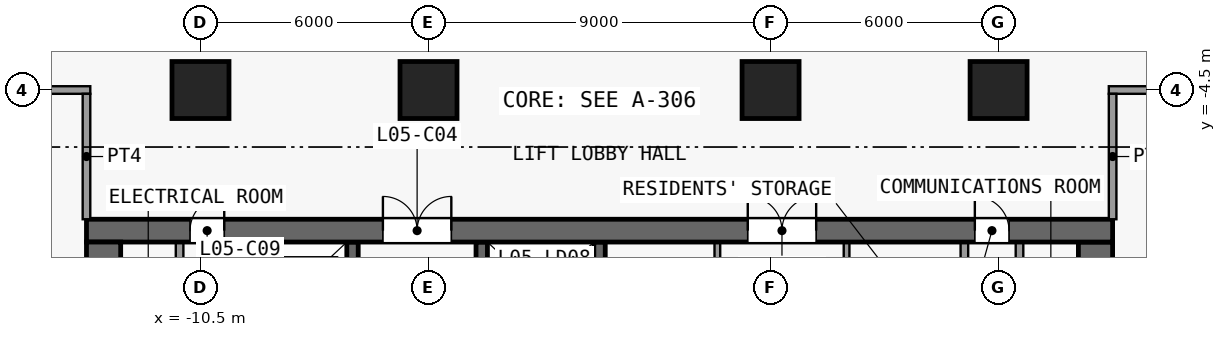
"""IFC4 building model, lengths in metres.
Left out: names, types, materials, properties, quantities, classifications, styles, units other than length and angle.
Written with IfcOpenShell. Run it as: python <this file> out.ifc"""

import sys

from ifc_helpers import new_model, si_unit, direction, frame, frame_2d, origin, origin_2d, place, context, subcontext, project, spatial, rectangle, extrude, element, fill, save


model = new_model("IFC4")
c1 = context("Model", 3, precision=1e-05, world=origin(), true_north=direction((0.0, 1.0)))
c2 = subcontext(c1, "Body", "Model", "MODEL_VIEW")
j1 = project(units=[si_unit("LENGTHUNIT", "METRE"), si_unit("PLANEANGLEUNIT", "RADIAN")], contexts=[c1])
p1 = place(None, origin())
s1 = spatial("IfcSite", under=j1, at=p1, CompositionType="ELEMENT")
p2 = place(p1, origin())
s2 = spatial("IfcBuilding", under=s1, at=p2, CompositionType="ELEMENT")
p3 = place(p2, frame((0.0, 0.0, 28.0)))
s3 = spatial("IfcBuildingStorey", under=s2, at=p3, CompositionType="ELEMENT", Elevation=28.0)
for number, where, z_axis, x_axis in (
    (1, (-10.5, -4.5, 0.0), (0.0, 0.0, 1.0), (1.0, 0.0, 0.0)),
    (2, (-4.5, -4.5, 0.0), (0.0, 0.0, 1.0), (1.0, 0.0, 0.0)),
    (3, (4.5, -4.5, 0.0), (0.0, 0.0, 1.0), (1.0, 0.0, 0.0)),
    (4, (10.5, -4.5, 0.0), (0.0, 0.0, 1.0), (1.0, 0.0, 0.0)),
):
    element("IfcColumn", number, at=place(p3, frame(where, z_axis=z_axis, x_axis=x_axis)), inside=s3, PredefinedType="COLUMN", context=c2, shape_type="SweptSolid", body=[
        extrude(rectangle(XDim=1.5, YDim=1.5, at=origin_2d()), origin(), (0.0, 0.0, 1.0), 4.5),
    ])
p4 = place(p3, frame((-13.5, -8.2, 0.0), z_axis=(0.0, 0.0, 1.0), x_axis=(1.0, 0.0, 0.0)))
e5 = element("IfcWall", 5, at=p4, inside=s3, PredefinedType="SHEAR", context=c2, shape_type="SweptSolid", body=[
    extrude(rectangle(XDim=27.0, YDim=0.6, at=frame_2d((13.5, 0.0))), origin(), (0.0, 0.0, 1.0), 4.1),
])
p5 = place(p4, frame((7.8, 0.0, 0.0)))
e6 = element("IfcOpeningElement", 6, at=p5, cuts=e5, PredefinedType="OPENING", context=c2, shape_type="SweptSolid", body=[
    extrude(rectangle(XDim=1.8, YDim=2.1, at=frame_2d((0.9, 1.05))), frame((0.0, 0.31, 0.0), z_axis=(0.0, -1.0, 0.0), x_axis=(1.0, 0.0, 0.0)), (0.0, 0.0, 1.0), 0.62),
])
p6 = place(p4, frame((17.4, 0.0, 0.0)))
e7 = element("IfcOpeningElement", 7, at=p6, cuts=e5, PredefinedType="OPENING", context=c2, shape_type="SweptSolid", body=[
    extrude(rectangle(XDim=1.8, YDim=2.1, at=frame_2d((0.9, 1.05))), frame((0.0, 0.31, 0.0), z_axis=(0.0, -1.0, 0.0), x_axis=(1.0, 0.0, 0.0)), (0.0, 0.0, 1.0), 0.62),
])
p7 = place(p4, frame((2.725, 0.0, 0.0)))
e8 = element("IfcOpeningElement", 8, at=p7, cuts=e5, PredefinedType="OPENING", context=c2, shape_type="SweptSolid", body=[
    extrude(rectangle(XDim=0.9, YDim=2.1, at=frame_2d((0.45, 1.05))), frame((0.0, 0.31, 0.0), z_axis=(0.0, -1.0, 0.0), x_axis=(1.0, 0.0, 0.0)), (0.0, 0.0, 1.0), 0.62),
])
p8 = place(p4, frame((23.375, 0.0, 0.0)))
e9 = element("IfcOpeningElement", 9, at=p8, cuts=e5, PredefinedType="OPENING", context=c2, shape_type="SweptSolid", body=[
    extrude(rectangle(XDim=0.9, YDim=2.1, at=frame_2d((0.45, 1.05))), frame((0.0, 0.31, 0.0), z_axis=(0.0, -1.0, 0.0), x_axis=(1.0, 0.0, 0.0)), (0.0, 0.0, 1.0), 0.62),
])
p9 = place(p3, frame((-13.05, -8.5, 0.0), z_axis=(0.0, 0.0, 1.0), x_axis=(0.0, -1.0, 0.0)))
e10 = element("IfcWall", 10, at=p9, inside=s3, PredefinedType="SHEAR", context=c2, shape_type="SweptSolid", body=[
    extrude(rectangle(XDim=16.1, YDim=0.9, at=frame_2d((8.05, 0.0))), origin(), (0.0, 0.0, 1.0), 4.1),
])
p10 = place(p9, frame((14.8, 0.0, 0.0)))
e11 = element("IfcOpeningElement", 11, at=p10, cuts=e10, PredefinedType="OPENING", context=c2, shape_type="SweptSolid", body=[
    extrude(rectangle(XDim=1.1, YDim=2.1, at=frame_2d((0.55, 1.05))), frame((0.0, 0.46, 0.0), z_axis=(0.0, -1.0, 0.0), x_axis=(1.0, 0.0, 0.0)), (0.0, 0.0, 1.0), 0.92),
])
p11 = place(p3, frame((13.05, -24.6, 0.0), z_axis=(0.0, 0.0, 1.0), x_axis=(0.0, 1.0, 0.0)))
e12 = element("IfcWall", 12, at=p11, inside=s3, PredefinedType="SHEAR", context=c2, shape_type="SweptSolid", body=[
    extrude(rectangle(XDim=16.1, YDim=0.9, at=frame_2d((8.05, 0.0))), origin(), (0.0, 0.0, 1.0), 4.1),
])
p12 = place(p11, frame((0.2, 0.0, 0.0)))
e13 = element("IfcOpeningElement", 13, at=p12, cuts=e12, PredefinedType="OPENING", context=c2, shape_type="SweptSolid", body=[
    extrude(rectangle(XDim=1.1, YDim=2.1, at=frame_2d((0.55, 1.05))), frame((0.0, 0.46, 0.0), z_axis=(0.0, -1.0, 0.0), x_axis=(1.0, 0.0, 0.0)), (0.0, 0.0, 1.0), 0.92),
])
p13 = place(p3, frame((-11.05, -10.7, 0.0), z_axis=(0.0, 0.0, 1.0), x_axis=(0.0, 1.0, 0.0)))
e14 = element("IfcWall", 14, at=p13, inside=s3, PredefinedType="PARTITIONING", context=c2, shape_type="SweptSolid", body=[
    extrude(rectangle(XDim=2.2, YDim=0.2, at=frame_2d((1.1, 0.0))), origin(), (0.0, 0.0, 1.0), 4.1),
])
p14 = place(p13, frame((0.7, 0.0, 0.0)))
e15 = element("IfcOpeningElement", 15, at=p14, cuts=e14, PredefinedType="OPENING", context=c2, shape_type="SweptSolid", body=[
    extrude(rectangle(XDim=0.9, YDim=2.1, at=frame_2d((0.45, 1.05))), frame((0.0, 0.11, 0.0), z_axis=(0.0, -1.0, 0.0), x_axis=(1.0, 0.0, 0.0)), (0.0, 0.0, 1.0), 0.22),
])
p15 = place(p3, frame((-9.6, -17.2, 0.0), z_axis=(0.0, 0.0, 1.0), x_axis=(0.0, 1.0, 0.0)))
e16 = element("IfcWall", 16, at=p15, inside=s3, PredefinedType="SHEAR", context=c2, shape_type="SweptSolid", body=[
    extrude(rectangle(XDim=8.7, YDim=0.3, at=frame_2d((4.35, 0.0))), origin(), (0.0, 0.0, 1.0), 4.1),
])
p16 = place(p3, frame((-6.5, -22.5, 0.0), z_axis=(0.0, 0.0, 1.0), x_axis=(0.0, 1.0, 0.0)))
e17 = element("IfcWall", 17, at=p16, inside=s3, PredefinedType="SHEAR", context=c2, shape_type="SweptSolid", body=[
    extrude(rectangle(XDim=14.0, YDim=0.3, at=frame_2d((7.0, 0.0))), origin(), (0.0, 0.0, 1.0), 4.1),
])
p17 = place(p16, frame((0.94, 0.0, 0.0)))
e18 = element("IfcOpeningElement", 18, at=p17, cuts=e17, PredefinedType="OPENING", context=c2, shape_type="SweptSolid", body=[
    extrude(rectangle(XDim=1.1, YDim=2.1, at=frame_2d((0.55, 1.05))), frame((0.0, 0.16, 0.0), z_axis=(0.0, -1.0, 0.0), x_axis=(1.0, 0.0, 0.0)), (0.0, 0.0, 1.0), 0.32),
])
p18 = place(p16, frame((3.72, 0.0, 0.0)))
e19 = element("IfcOpeningElement", 19, at=p18, cuts=e17, PredefinedType="OPENING", context=c2, shape_type="SweptSolid", body=[
    extrude(rectangle(XDim=1.1, YDim=2.1, at=frame_2d((0.55, 1.05))), frame((0.0, 0.16, 0.0), z_axis=(0.0, -1.0, 0.0), x_axis=(1.0, 0.0, 0.0)), (0.0, 0.0, 1.0), 0.32),
])
p19 = place(p16, frame((6.5, 0.0, 0.0)))
e20 = element("IfcOpeningElement", 20, at=p19, cuts=e17, PredefinedType="OPENING", context=c2, shape_type="SweptSolid", body=[
    extrude(rectangle(XDim=1.1, YDim=2.1, at=frame_2d((0.55, 1.05))), frame((0.0, 0.16, 0.0), z_axis=(0.0, -1.0, 0.0), x_axis=(1.0, 0.0, 0.0)), (0.0, 0.0, 1.0), 0.32),
])
p20 = place(p16, frame((9.28, 0.0, 0.0)))
e21 = element("IfcOpeningElement", 21, at=p20, cuts=e17, PredefinedType="OPENING", context=c2, shape_type="SweptSolid", body=[
    extrude(rectangle(XDim=1.1, YDim=2.1, at=frame_2d((0.55, 1.05))), frame((0.0, 0.16, 0.0), z_axis=(0.0, -1.0, 0.0), x_axis=(1.0, 0.0, 0.0)), (0.0, 0.0, 1.0), 0.32),
])
p21 = place(p16, frame((12.06, 0.0, 0.0)))
e22 = element("IfcOpeningElement", 22, at=p21, cuts=e17, PredefinedType="OPENING", context=c2, shape_type="SweptSolid", body=[
    extrude(rectangle(XDim=1.1, YDim=2.1, at=frame_2d((0.55, 1.05))), frame((0.0, 0.16, 0.0), z_axis=(0.0, -1.0, 0.0), x_axis=(1.0, 0.0, 0.0)), (0.0, 0.0, 1.0), 0.32),
])
p22 = place(p3, frame((-3.1, -22.55, 0.0), z_axis=(0.0, 0.0, 1.0), x_axis=(0.0, 1.0, 0.0)))
e23 = element("IfcWall", 23, at=p22, inside=s3, PredefinedType="SHEAR", context=c2, shape_type="SweptSolid", body=[
    extrude(rectangle(XDim=14.05, YDim=0.3, at=frame_2d((7.025, 0.0))), origin(), (0.0, 0.0, 1.0), 4.1),
])
p23 = place(p22, frame((12.11, 0.0, 0.0)))
e24 = element("IfcOpeningElement", 24, at=p23, cuts=e23, PredefinedType="OPENING", context=c2, shape_type="SweptSolid", body=[
    extrude(rectangle(XDim=1.1, YDim=2.1, at=frame_2d((0.55, 1.05))), frame((0.0, 0.16, 0.0), z_axis=(0.0, -1.0, 0.0), x_axis=(1.0, 0.0, 0.0)), (0.0, 0.0, 1.0), 0.32),
])
p24 = place(p22, frame((0.84, 0.0, 0.0)))
e25 = element("IfcOpeningElement", 25, at=p24, cuts=e23, PredefinedType="OPENING", context=c2, shape_type="SweptSolid", body=[
    extrude(rectangle(XDim=1.4, YDim=2.1, at=frame_2d((0.7, 1.05))), frame((0.0, 0.16, 0.0), z_axis=(0.0, -1.0, 0.0), x_axis=(1.0, 0.0, 0.0)), (0.0, 0.0, 1.0), 0.32),
])
p25 = place(p3, frame((0.0, -22.25, 0.0), z_axis=(0.0, 0.0, 1.0), x_axis=(0.0, 1.0, 0.0)))
e26 = element("IfcWall", 26, at=p25, inside=s3, PredefinedType="SHEAR", context=c2, shape_type="SweptSolid", body=[
    extrude(rectangle(XDim=13.75, YDim=0.3, at=frame_2d((6.875, 0.0))), origin(), (0.0, 0.0, 1.0), 4.1),
])
p26 = place(p3, frame((3.1, -19.4, 0.0), z_axis=(0.0, 0.0, 1.0), x_axis=(0.0, 1.0, 0.0)))
e27 = element("IfcWall", 27, at=p26, inside=s3, PredefinedType="PARTITIONING", context=c2, shape_type="SweptSolid", body=[
    extrude(rectangle(XDim=10.9, YDim=0.15, at=frame_2d((5.45, 0.0))), origin(), (0.0, 0.0, 1.0), 4.1),
])
p27 = place(p26, frame((4.8, 0.0, 0.0)))
e28 = element("IfcOpeningElement", 28, at=p27, cuts=e27, PredefinedType="OPENING", context=c2, shape_type="SweptSolid", body=[
    extrude(rectangle(XDim=1.2, YDim=2.1, at=frame_2d((0.6, 1.05))), frame((0.0, 0.085, 0.0), z_axis=(0.0, -1.0, 0.0), x_axis=(1.0, 0.0, 0.0)), (0.0, 0.0, 1.0), 0.17),
])
p28 = place(p3, frame((6.5, -8.5, 0.0), z_axis=(0.0, 0.0, 1.0), x_axis=(0.0, -1.0, 0.0)))
e29 = element("IfcWall", 29, at=p28, inside=s3, PredefinedType="PARTITIONING", context=c2, shape_type="SweptSolid", body=[
    extrude(rectangle(XDim=10.85, YDim=0.15, at=frame_2d((5.425, 0.0))), origin(), (0.0, 0.0, 1.0), 4.1),
])
p29 = place(p28, frame((6.275, 0.0, 0.0)))
e30 = element("IfcOpeningElement", 30, at=p29, cuts=e29, PredefinedType="OPENING", context=c2, shape_type="SweptSolid", body=[
    extrude(rectangle(XDim=1.2, YDim=2.1, at=frame_2d((0.6, 1.05))), frame((0.0, 0.085, 0.0), z_axis=(0.0, -1.0, 0.0), x_axis=(1.0, 0.0, 0.0)), (0.0, 0.0, 1.0), 0.17),
])
p30 = place(p28, frame((0.925, 0.0, 0.0)))
e31 = element("IfcOpeningElement", 31, at=p30, cuts=e29, PredefinedType="OPENING", context=c2, shape_type="SweptSolid", body=[
    extrude(rectangle(XDim=0.9, YDim=2.1, at=frame_2d((0.45, 1.05))), frame((0.0, 0.085, 0.0), z_axis=(0.0, -1.0, 0.0), x_axis=(1.0, 0.0, 0.0)), (0.0, 0.0, 1.0), 0.17),
])
p31 = place(p3, frame((9.6, -16.9, 0.0), z_axis=(0.0, 0.0, 1.0), x_axis=(0.0, 1.0, 0.0)))
e32 = element("IfcWall", 32, at=p31, inside=s3, PredefinedType="PARTITIONING", context=c2, shape_type="SweptSolid", body=[
    extrude(rectangle(XDim=8.4, YDim=0.2, at=frame_2d((4.2, 0.0))), origin(), (0.0, 0.0, 1.0), 4.1),
])
p32 = place(p3, frame((11.05, -8.5, 0.0), z_axis=(0.0, 0.0, 1.0), x_axis=(0.0, -1.0, 0.0)))
e33 = element("IfcWall", 33, at=p32, inside=s3, PredefinedType="PARTITIONING", context=c2, shape_type="SweptSolid", body=[
    extrude(rectangle(XDim=2.9, YDim=0.2, at=frame_2d((1.45, 0.0))), origin(), (0.0, 0.0, 1.0), 4.1),
])
p33 = place(p32, frame((0.95, 0.0, 0.0)))
e34 = element("IfcOpeningElement", 34, at=p33, cuts=e33, PredefinedType="OPENING", context=c2, shape_type="SweptSolid", body=[
    extrude(rectangle(XDim=0.9, YDim=2.1, at=frame_2d((0.45, 1.05))), frame((0.0, 0.11, 0.0), z_axis=(0.0, -1.0, 0.0), x_axis=(1.0, 0.0, 0.0)), (0.0, 0.0, 1.0), 0.22),
])
p34 = place(p3, frame((-31.6, -4.5, 0.0), z_axis=(0.0, 0.0, 1.0), x_axis=(1.0, 0.0, 0.0)))
e35 = element("IfcWall", 35, at=p34, inside=s3, PredefinedType="PARTITIONING", context=c2, shape_type="SweptSolid", body=[
    extrude(rectangle(XDim=18.2, YDim=0.2, at=frame_2d((9.1, 0.0))), origin(), (0.0, 0.0, 1.0), 4.1),
])
p35 = place(p34, frame((2.8, 0.0, 0.0)))
e36 = element("IfcOpeningElement", 36, at=p35, cuts=e35, PredefinedType="OPENING", context=c2, shape_type="SweptSolid", body=[
    extrude(rectangle(XDim=1.8, YDim=2.1, at=frame_2d((0.9, 1.05))), frame((0.0, 0.11, 0.0), z_axis=(0.0, -1.0, 0.0), x_axis=(1.0, 0.0, 0.0)), (0.0, 0.0, 1.0), 0.22),
])
p36 = place(p34, frame((12.4, 0.0, 0.0)))
e37 = element("IfcOpeningElement", 37, at=p36, cuts=e35, PredefinedType="OPENING", context=c2, shape_type="SweptSolid", body=[
    extrude(rectangle(XDim=1.8, YDim=2.1, at=frame_2d((0.9, 1.05))), frame((0.0, 0.11, 0.0), z_axis=(0.0, -1.0, 0.0), x_axis=(1.0, 0.0, 0.0)), (0.0, 0.0, 1.0), 0.22),
])
p37 = place(p3, frame((13.4, -4.5, 0.0), z_axis=(0.0, 0.0, 1.0), x_axis=(1.0, 0.0, 0.0)))
e38 = element("IfcWall", 38, at=p37, inside=s3, PredefinedType="PARTITIONING", context=c2, shape_type="SweptSolid", body=[
    extrude(rectangle(XDim=15.2, YDim=0.2, at=frame_2d((7.6, 0.0))), origin(), (0.0, 0.0, 1.0), 4.1),
])
p38 = place(p37, frame((7.1, 0.0, 0.0)))
e39 = element("IfcOpeningElement", 39, at=p38, cuts=e38, PredefinedType="OPENING", context=c2, shape_type="SweptSolid", body=[
    extrude(rectangle(XDim=1.0, YDim=2.1, at=frame_2d((0.5, 1.05))), frame((0.0, 0.11, 0.0), z_axis=(0.0, -1.0, 0.0), x_axis=(1.0, 0.0, 0.0)), (0.0, 0.0, 1.0), 0.22),
])
for number, where, z_axis, x_axis in (
    (40, (-13.5, -7.9, 0.0), (0.0, 0.0, 1.0), (0.0, 1.0, 0.0)),
    (41, (13.5, -7.9, 0.0), (0.0, 0.0, 1.0), (0.0, 1.0, 0.0)),
):
    element("IfcWall", number, at=place(p3, frame(where, z_axis=z_axis, x_axis=x_axis)), inside=s3, PredefinedType="PARTITIONING", context=c2, shape_type="SweptSolid", body=[
        extrude(rectangle(XDim=3.3, YDim=0.2, at=frame_2d((1.65, 0.0))), origin(), (0.0, 0.0, 1.0), 4.1),
    ])
p39 = place(p5, origin())
e42 = element("IfcDoor", 42, at=p39, inside=s3, OperationType="DOUBLE_DOOR_SINGLE_SWING", PredefinedType="DOOR", context=c2, shape_type="SweptSolid", body=[
    extrude(rectangle(XDim=1.8, YDim=2.1, at=frame_2d((0.9, 1.05))), frame((0.0, 0.025, 0.0), z_axis=(0.0, -1.0, 0.0), x_axis=(1.0, 0.0, 0.0)), (0.0, 0.0, 1.0), 0.05),
])
fill(e6, e42)
p40 = place(p6, origin())
e43 = element("IfcDoor", 43, at=p40, inside=s3, OperationType="DOUBLE_DOOR_SINGLE_SWING", PredefinedType="DOOR", context=c2, shape_type="SweptSolid", body=[
    extrude(rectangle(XDim=1.8, YDim=2.1, at=frame_2d((0.9, 1.05))), frame((0.0, 0.025, 0.0), z_axis=(0.0, -1.0, 0.0), x_axis=(1.0, 0.0, 0.0)), (0.0, 0.0, 1.0), 0.05),
])
fill(e7, e43)
p41 = place(p7, origin())
e44 = element("IfcDoor", 44, at=p41, inside=s3, OperationType="SINGLE_SWING_RIGHT", PredefinedType="DOOR", context=c2, shape_type="SweptSolid", body=[
    extrude(rectangle(XDim=0.9, YDim=2.1, at=frame_2d((0.45, 1.05))), frame((0.0, 0.025, 0.0), z_axis=(0.0, -1.0, 0.0), x_axis=(1.0, 0.0, 0.0)), (0.0, 0.0, 1.0), 0.05),
])
fill(e8, e44)
p42 = place(p8, origin())
e45 = element("IfcDoor", 45, at=p42, inside=s3, OperationType="SINGLE_SWING_LEFT", PredefinedType="DOOR", context=c2, shape_type="SweptSolid", body=[
    extrude(rectangle(XDim=0.9, YDim=2.1, at=frame_2d((0.45, 1.05))), frame((0.0, 0.025, 0.0), z_axis=(0.0, -1.0, 0.0), x_axis=(1.0, 0.0, 0.0)), (0.0, 0.0, 1.0), 0.05),
])
fill(e9, e45)
save(model, sys.argv[1])
